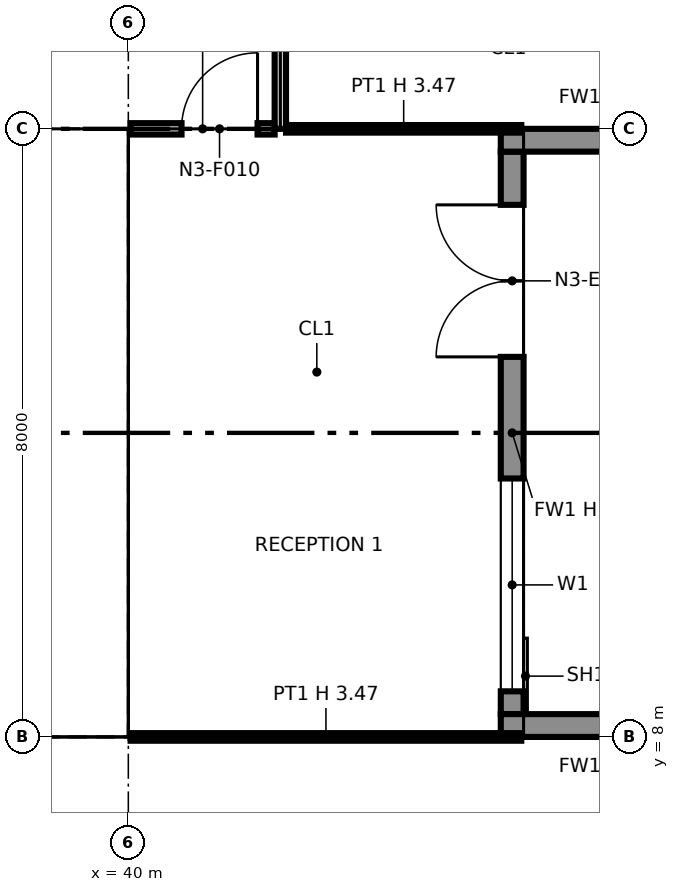
"""IFC4 building model, lengths in metres.
Left out: names, types, materials, properties, quantities, classifications, styles, units other than length and angle.
Written with IfcOpenShell. Run it as: python <this file> out.ifc"""

import sys

from ifc_helpers import new_model, si_unit, direction, frame, frame_2d, origin, origin_2d, place, context, subcontext, project, spatial, polyline, rectangle, i_section, outline, extrude, element, fill, save


model = new_model("IFC4")
c1 = context("Model", 3, precision=1e-05, world=origin(), true_north=direction((0.0, 1.0)))
c2 = subcontext(c1, "Body", "Model", "MODEL_VIEW")
j1 = project(units=[si_unit("LENGTHUNIT", "METRE"), si_unit("PLANEANGLEUNIT", "RADIAN")], contexts=[c1])
p1 = place(None, origin())
s1 = spatial("IfcSite", under=j1, at=p1, CompositionType="ELEMENT")
p2 = place(p1, origin())
s2 = spatial("IfcBuilding", under=s1, at=p2, CompositionType="ELEMENT")
p3 = place(p2, frame((0.0, 0.0, 70.0)))
s3 = spatial("IfcBuildingStorey", under=s2, at=p3, CompositionType="ELEMENT", Elevation=70.0)
for number, where, z_axis, x_axis in (
    (1, (40.0, 8.0, 0.0), (0.0, 0.0, 1.0), (1.0, 0.0, 0.0)),
    (2, (40.0, 16.0, 0.0), (0.0, 0.0, 1.0), (1.0, 0.0, 0.0)),
):
    element("IfcColumn", number, at=place(p3, frame(where, z_axis=z_axis, x_axis=x_axis)), inside=s3, PredefinedType="COLUMN", context=c2, shape_type="SweptSolid", body=[
        extrude(i_section(OverallWidth=0.406, OverallDepth=0.417, WebThickness=0.03, FlangeThickness=0.048, at=origin_2d()), origin(), (0.0, 0.0, 1.0), 4.25),
    ])
p4 = place(p3, frame((45.05, 8.3, 0.0), z_axis=(0.0, 0.0, 1.0), x_axis=(0.0, 1.0, 0.0)))
e3 = element("IfcWall", 3, at=p4, inside=s3, PredefinedType="SOLIDWALL", context=c2, shape_type="SweptSolid", body=[
    extrude(rectangle(XDim=7.4, YDim=0.3, at=frame_2d((3.7, 0.0))), origin(), (0.0, 0.0, 1.0), 4.25),
])
p5 = place(p4, frame((0.3, 0.0, 0.9)))
e4 = element("IfcOpeningElement", 4, at=p5, cuts=e3, PredefinedType="OPENING", context=c2, shape_type="SweptSolid", body=[
    extrude(rectangle(XDim=2.8, YDim=2.2, at=frame_2d((1.4, 1.1))), frame((0.0, 0.16, 0.0), z_axis=(0.0, -1.0, 0.0), x_axis=(1.0, 0.0, 0.0)), (0.0, 0.0, 1.0), 0.32),
])
p6 = place(p4, frame((4.7, 0.0, 0.0)))
e5 = element("IfcOpeningElement", 5, at=p6, cuts=e3, PredefinedType="OPENING", context=c2, shape_type="SweptSolid", body=[
    extrude(rectangle(XDim=2.0, YDim=2.4, at=frame_2d((1.0, 1.2))), frame((0.0, 0.16, 0.0), z_axis=(0.0, -1.0, 0.0), x_axis=(1.0, 0.0, 0.0)), (0.0, 0.0, 1.0), 0.32),
])
p7 = place(p3, frame((47.9, 8.15, 0.0), z_axis=(0.0, 0.0, 1.0), x_axis=(-1.0, 0.0, 0.0)))
e6 = element("IfcWall", 6, at=p7, inside=s3, PredefinedType="SOLIDWALL", context=c2, shape_type="SweptSolid", body=[
    extrude(rectangle(XDim=3.0, YDim=0.3, at=frame_2d((1.5, 0.0))), origin(), (0.0, 0.0, 1.0), 3.469),
])
p8 = place(p3, frame((47.9, 15.85, 0.0), z_axis=(0.0, 0.0, 1.0), x_axis=(-1.0, 0.0, 0.0)))
e7 = element("IfcWall", 7, at=p8, inside=s3, PredefinedType="SOLIDWALL", context=c2, shape_type="SweptSolid", body=[
    extrude(rectangle(XDim=3.0, YDim=0.3, at=frame_2d((1.5, 0.0))), origin(), (0.0, 0.0, 1.0), 3.556),
])
p9 = place(p3, frame((24.65, 8.75, 0.0), z_axis=(0.0, 0.0, 1.0), x_axis=(1.0, 0.0, 0.0)))
e8 = element("IfcWall", 8, at=p9, inside=s3, PredefinedType="PARTITIONING", context=c2, shape_type="SweptSolid", body=[
    extrude(outline(polyline([(0.0, 0.0), (14.7, 0.0), (14.7, 4.25), (7.469, 4.25), (7.469, 3.632), (7.231, 3.632), (7.23, 4.25), (0.0, 4.25), (0.0, 0.0)])), frame((0.0, 0.1, 0.0), z_axis=(0.0, -1.0, 0.0), x_axis=(1.0, 0.0, 0.0)), (0.0, 0.0, 1.0), 0.2),
])
p10 = place(p3, frame((24.65, 15.25, 0.0), z_axis=(0.0, 0.0, 1.0), x_axis=(1.0, 0.0, 0.0)))
e9 = element("IfcWall", 9, at=p10, inside=s3, PredefinedType="PARTITIONING", context=c2, shape_type="SweptSolid", body=[
    extrude(outline(polyline([(0.0, 0.0), (14.7, 0.0), (14.7, 4.25), (7.469, 4.25), (7.469, 3.632), (7.231, 3.632), (7.23, 4.25), (0.0, 4.25), (0.0, 0.0)])), frame((0.0, 0.1, 0.0), z_axis=(0.0, -1.0, 0.0), x_axis=(1.0, 0.0, 0.0)), (0.0, 0.0, 1.0), 0.2),
])
p11 = place(p10, frame((2.85, 0.0, 0.0)))
e10 = element("IfcOpeningElement", 10, at=p11, cuts=e9, PredefinedType="OPENING", context=c2, shape_type="SweptSolid", body=[
    extrude(rectangle(XDim=1.8, YDim=2.1, at=frame_2d((0.9, 1.05))), frame((0.0, 0.11, 0.0), z_axis=(0.0, -1.0, 0.0), x_axis=(1.0, 0.0, 0.0)), (0.0, 0.0, 1.0), 0.22),
])
p12 = place(p10, frame((9.95, 0.0, 0.0), z_axis=(0.0, 0.0, 1.0), x_axis=(-1.0, 0.0, 0.0)))
e11 = element("IfcOpeningElement", 11, at=p12, cuts=e9, PredefinedType="OPENING", context=c2, shape_type="SweptSolid", body=[
    extrude(rectangle(XDim=1.4, YDim=2.1, at=frame_2d((0.7, 1.05))), frame((0.0, 0.11, 0.0), z_axis=(0.0, -1.0, 0.0), x_axis=(1.0, 0.0, 0.0)), (0.0, 0.0, 1.0), 0.22),
])
p13 = place(p10, frame((13.4, 0.0, 0.0), z_axis=(0.0, 0.0, 1.0), x_axis=(-1.0, 0.0, 0.0)))
e12 = element("IfcOpeningElement", 12, at=p13, cuts=e9, PredefinedType="OPENING", context=c2, shape_type="SweptSolid", body=[
    extrude(rectangle(XDim=1.4, YDim=2.1, at=frame_2d((0.7, 1.05))), frame((0.0, 0.11, 0.0), z_axis=(0.0, -1.0, 0.0), x_axis=(1.0, 0.0, 0.0)), (0.0, 0.0, 1.0), 0.22),
])
p14 = place(p3, frame((39.25, 8.85, 0.0), z_axis=(0.0, 0.0, 1.0), x_axis=(0.0, 1.0, 0.0)))
e13 = element("IfcWall", 13, at=p14, inside=s3, PredefinedType="PARTITIONING", context=c2, shape_type="SweptSolid", body=[
    extrude(rectangle(XDim=6.3, YDim=0.2, at=frame_2d((3.15, 0.0))), origin(), (0.0, 0.0, 1.0), 4.25),
])
p15 = place(p3, frame((40.03, 8.0, 0.0), z_axis=(0.0, 0.0, 1.0), x_axis=(1.0, 0.0, 0.0)))
e14 = element("IfcWall", 14, at=p15, inside=s3, PredefinedType="PARTITIONING", context=c2, shape_type="SweptSolid", body=[
    extrude(rectangle(XDim=5.14, YDim=0.1, at=frame_2d((2.57, 0.0))), origin(), (0.0, 0.0, 1.0), 3.47),
])
p16 = place(p3, frame((40.03, 16.0, 0.0), z_axis=(0.0, 0.0, 1.0), x_axis=(1.0, 0.0, 0.0)))
e15 = element("IfcWall", 15, at=p16, inside=s3, PredefinedType="PARTITIONING", context=c2, shape_type="SweptSolid", body=[
    extrude(rectangle(XDim=1.895, YDim=0.15, at=frame_2d((0.948, 0.0))), origin(), (0.0, 0.0, 1.0), 3.47),
])
p17 = place(p16, frame((0.67, 0.0, 0.0)))
e16 = element("IfcOpeningElement", 16, at=p17, cuts=e15, PredefinedType="OPENING", context=c2, shape_type="SweptSolid", body=[
    extrude(rectangle(XDim=1.0, YDim=2.1, at=frame_2d((0.5, 1.05))), frame((0.0, 0.085, 0.0), z_axis=(0.0, -1.0, 0.0), x_axis=(1.0, 0.0, 0.0)), (0.0, 0.0, 1.0), 0.17),
])
p18 = place(p3, frame((42.075, 16.0, 0.0), z_axis=(0.0, 0.0, 1.0), x_axis=(1.0, 0.0, 0.0)))
e17 = element("IfcWall", 17, at=p18, inside=s3, PredefinedType="PARTITIONING", context=c2, shape_type="SweptSolid", body=[
    extrude(rectangle(XDim=3.095, YDim=0.1, at=frame_2d((1.547, 0.0))), origin(), (0.0, 0.0, 1.0), 3.47),
])
p19 = place(p3, frame((42.0, 16.0, 0.0), z_axis=(0.0, 0.0, 1.0), x_axis=(0.0, 1.0, 0.0)))
e18 = element("IfcWall", 18, at=p19, inside=s3, PredefinedType="PARTITIONING", context=c2, shape_type="SweptSolid", body=[
    extrude(outline(polyline([(0.0, 0.0), (25.925, 0.0), (25.925, 4.25), (24.3, 4.25), (24.298, 3.47), (23.702, 3.47), (23.7, 4.25), (20.3, 4.25), (20.298, 3.47), (19.702, 3.47), (19.7, 4.25), (16.3, 4.25), (16.298, 3.47), (15.702, 3.47), (15.7, 4.25), (12.3, 4.25), (12.298, 3.47), (11.702, 3.47), (11.7, 4.25), (8.3, 4.25), (8.298, 3.47), (7.702, 3.47), (7.7, 4.25), (4.3, 4.25), (4.298, 3.47), (3.702, 3.47), (3.7, 4.25), (0.0, 4.25), (0.0, 0.0)])), frame((0.0, 0.075, 0.0), z_axis=(0.0, -1.0, 0.0), x_axis=(1.0, 0.0, 0.0)), (0.0, 0.0, 1.0), 0.15),
])
p20 = place(p19, frame((2.5, 0.0, 0.0), z_axis=(0.0, 0.0, 1.0), x_axis=(-1.0, 0.0, 0.0)))
e19 = element("IfcOpeningElement", 19, at=p20, cuts=e18, PredefinedType="OPENING", context=c2, shape_type="SweptSolid", body=[
    extrude(rectangle(XDim=1.0, YDim=2.1, at=frame_2d((0.5, 1.05))), frame((0.0, 0.085, 0.0), z_axis=(0.0, -1.0, 0.0), x_axis=(1.0, 0.0, 0.0)), (0.0, 0.0, 1.0), 0.17),
])
p21 = place(p19, frame((6.5, 0.0, 0.0), z_axis=(0.0, 0.0, 1.0), x_axis=(-1.0, 0.0, 0.0)))
e20 = element("IfcOpeningElement", 20, at=p21, cuts=e18, PredefinedType="OPENING", context=c2, shape_type="SweptSolid", body=[
    extrude(rectangle(XDim=1.0, YDim=2.1, at=frame_2d((0.5, 1.05))), frame((0.0, 0.085, 0.0), z_axis=(0.0, -1.0, 0.0), x_axis=(1.0, 0.0, 0.0)), (0.0, 0.0, 1.0), 0.17),
])
p22 = place(p19, frame((9.3, 0.0, 0.0), z_axis=(0.0, 0.0, 1.0), x_axis=(-1.0, 0.0, 0.0)))
e21 = element("IfcOpeningElement", 21, at=p22, cuts=e18, PredefinedType="OPENING", context=c2, shape_type="SweptSolid", body=[
    extrude(rectangle(XDim=1.0, YDim=2.1, at=frame_2d((0.5, 1.05))), frame((0.0, 0.085, 0.0), z_axis=(0.0, -1.0, 0.0), x_axis=(1.0, 0.0, 0.0)), (0.0, 0.0, 1.0), 0.17),
])
p23 = place(p19, frame((14.5, 0.0, 0.0), z_axis=(0.0, 0.0, 1.0), x_axis=(-1.0, 0.0, 0.0)))
e22 = element("IfcOpeningElement", 22, at=p23, cuts=e18, PredefinedType="OPENING", context=c2, shape_type="SweptSolid", body=[
    extrude(rectangle(XDim=1.0, YDim=2.1, at=frame_2d((0.5, 1.05))), frame((0.0, 0.085, 0.0), z_axis=(0.0, -1.0, 0.0), x_axis=(1.0, 0.0, 0.0)), (0.0, 0.0, 1.0), 0.17),
])
p24 = place(p19, frame((18.5, 0.0, 0.0), z_axis=(0.0, 0.0, 1.0), x_axis=(-1.0, 0.0, 0.0)))
e23 = element("IfcOpeningElement", 23, at=p24, cuts=e18, PredefinedType="OPENING", context=c2, shape_type="SweptSolid", body=[
    extrude(rectangle(XDim=1.0, YDim=2.1, at=frame_2d((0.5, 1.05))), frame((0.0, 0.085, 0.0), z_axis=(0.0, -1.0, 0.0), x_axis=(1.0, 0.0, 0.0)), (0.0, 0.0, 1.0), 0.17),
])
p25 = place(p19, frame((22.5, 0.0, 0.0), z_axis=(0.0, 0.0, 1.0), x_axis=(-1.0, 0.0, 0.0)))
e24 = element("IfcOpeningElement", 24, at=p25, cuts=e18, PredefinedType="OPENING", context=c2, shape_type="SweptSolid", body=[
    extrude(rectangle(XDim=1.0, YDim=2.1, at=frame_2d((0.5, 1.05))), frame((0.0, 0.085, 0.0), z_axis=(0.0, -1.0, 0.0), x_axis=(1.0, 0.0, 0.0)), (0.0, 0.0, 1.0), 0.17),
])
p26 = place(p19, frame((25.5, 0.0, 0.0), z_axis=(0.0, 0.0, 1.0), x_axis=(-1.0, 0.0, 0.0)))
e25 = element("IfcOpeningElement", 25, at=p26, cuts=e18, PredefinedType="OPENING", context=c2, shape_type="SweptSolid", body=[
    extrude(rectangle(XDim=1.0, YDim=2.1, at=frame_2d((0.5, 1.05))), frame((0.0, 0.085, 0.0), z_axis=(0.0, -1.0, 0.0), x_axis=(1.0, 0.0, 0.0)), (0.0, 0.0, 1.0), 0.17),
])
p27 = place(p5, origin())
e26 = element("IfcWindow", 26, at=p27, inside=s3, PartitioningType="SINGLE_PANEL", PredefinedType="WINDOW", context=c2, shape_type="SweptSolid", body=[
    extrude(rectangle(XDim=2.8, YDim=2.2, at=frame_2d((1.4, 1.1))), frame((0.0, 0.03, 0.0), z_axis=(0.0, -1.0, 0.0), x_axis=(1.0, 0.0, 0.0)), (0.0, 0.0, 1.0), 0.06),
])
fill(e4, e26)
p28 = place(p6, origin())
e27 = element("IfcDoor", 27, at=p28, inside=s3, OperationType="DOUBLE_DOOR_SINGLE_SWING", PredefinedType="DOOR", context=c2, shape_type="SweptSolid", body=[
    extrude(rectangle(XDim=2.0, YDim=2.4, at=frame_2d((1.0, 1.2))), frame((0.0, 0.025, 0.0), z_axis=(0.0, -1.0, 0.0), x_axis=(1.0, 0.0, 0.0)), (0.0, 0.0, 1.0), 0.05),
])
fill(e5, e27)
p29 = place(p17, origin())
e28 = element("IfcDoor", 28, at=p29, inside=s3, OperationType="SINGLE_SWING_RIGHT", PredefinedType="DOOR", context=c2, shape_type="SweptSolid", body=[
    extrude(rectangle(XDim=1.0, YDim=2.1, at=frame_2d((0.5, 1.05))), frame((0.0, 0.025, 0.0), z_axis=(0.0, -1.0, 0.0), x_axis=(1.0, 0.0, 0.0)), (0.0, 0.0, 1.0), 0.05),
])
fill(e16, e28)
save(model, sys.argv[1])
